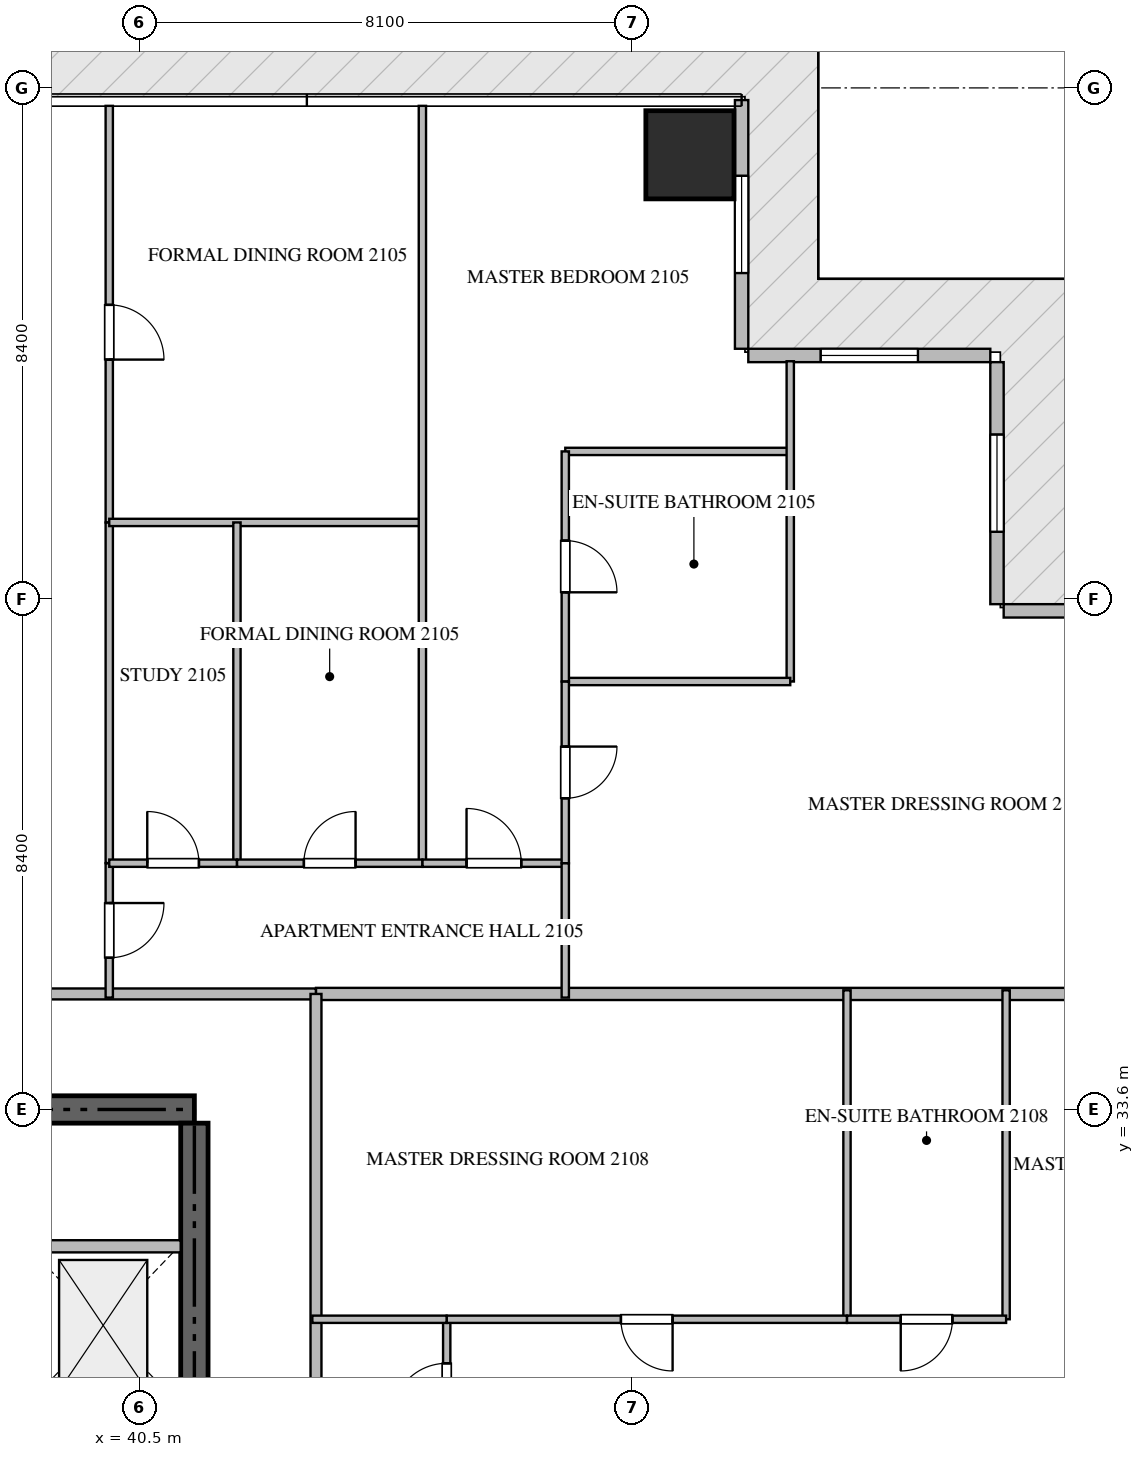
"""IFC4 building model, lengths in metres.
Left out: names, types, materials, properties, quantities, classifications, styles, units other than length and angle.
Written with IfcOpenShell. Run it as: python <this file> out.ifc"""

import sys

from ifc_helpers import new_model, si_unit, direction, frame, frame_2d, origin, origin_2d, place, context, subcontext, project, spatial, rectangle, extrude, source, transform, mapped, element, fill, save


model = new_model("IFC4")
c1 = context("Model", 3, precision=1e-05, world=origin(), true_north=direction((0.0, 1.0)))
c2 = subcontext(c1, "Body", "Model", "MODEL_VIEW")
j1 = project(units=[si_unit("LENGTHUNIT", "METRE"), si_unit("PLANEANGLEUNIT", "RADIAN")], contexts=[c1])
p1 = place(None, origin())
s1 = spatial("IfcSite", under=j1, at=p1, CompositionType="ELEMENT")
p2 = place(p1, origin())
s2 = spatial("IfcBuilding", under=s1, at=p2, CompositionType="ELEMENT")
p3 = place(p2, frame((0.0, 0.0, 86.7)))
s3 = spatial("IfcBuildingStorey", under=s2, at=p3, CompositionType="ELEMENT", Elevation=86.7)
p4 = place(p3, frame((41.4, 33.6, -0.26), z_axis=(0.0, 0.0, 1.0), x_axis=(-1.0, 0.0, 0.0)))
e1 = element("IfcWall", 1, at=p4, inside=s3, PredefinedType="SHEAR", context=c2, shape_type="SweptSolid", body=[
    extrude(rectangle(XDim=18.0, YDim=0.45, at=frame_2d((9.0, 0.0))), origin(), (0.0, 0.0, 1.0), 3.748),
])
p5 = place(p3, frame((41.4, 27.75, -0.26), z_axis=(0.0, 0.0, 1.0), x_axis=(0.0, 1.0, 0.0)))
e2 = element("IfcWall", 2, at=p5, inside=s3, PredefinedType="SHEAR", context=c2, shape_type="SweptSolid", body=[
    extrude(rectangle(XDim=5.625, YDim=0.45, at=frame_2d((2.812, 0.0))), origin(), (0.0, 0.0, 1.0), 3.748),
])
m1 = source(origin(), c2, "Body", "SweptSolid", [
    extrude(rectangle(XDim=1.45, YDim=1.45, at=origin_2d()), origin(), (0.0, 0.0, 1.0), 3.75),
])
p6 = place(p3, frame((49.55, 49.3, -0.26), z_axis=(0.0, 0.0, 1.0), x_axis=(1.0, 0.0, 0.0)))
e3 = element("IfcColumn", 3, at=p6, inside=s3, PredefinedType="COLUMN", context=c2, shape_type="MappedRepresentation", body=[
    mapped(m1, transform((0.0, 0.0, 0.0), scale=1.0)),
])
p7 = place(p3, frame((58.8, 41.8, 0.0), z_axis=(0.0, 0.0, 1.0), x_axis=(-1.0, 0.0, 0.0)))
e4 = element("IfcWall", 4, at=p7, inside=s3, PredefinedType="ELEMENTEDWALL", context=c2, shape_type="SweptSolid", body=[
    extrude(rectangle(XDim=4.09, YDim=0.22, at=frame_2d((2.045, 0.0))), origin(), (0.0, 0.0, 1.0), 3.475),
])
p8 = place(p7, frame((1.245, 0.0, 0.65)))
e5 = element("IfcOpeningElement", 5, at=p8, cuts=e4, PredefinedType="OPENING", context=c2, shape_type="SweptSolid", body=[
    extrude(rectangle(XDim=1.6, YDim=2.1, at=frame_2d((0.8, 1.05))), frame((0.0, 0.12, 0.0), z_axis=(0.0, -1.0, 0.0), x_axis=(1.0, 0.0, 0.0)), (0.0, 0.0, 1.0), 0.24),
])
p9 = place(p3, frame((54.6, 41.91, 0.0), z_axis=(0.0, 0.0, 1.0), x_axis=(0.0, 1.0, 0.0)))
e6 = element("IfcWall", 6, at=p9, inside=s3, PredefinedType="ELEMENTEDWALL", context=c2, shape_type="SweptSolid", body=[
    extrude(rectangle(XDim=3.98, YDim=0.22, at=frame_2d((1.99, 0.0))), origin(), (0.0, 0.0, 1.0), 3.475),
])
p10 = place(p9, frame((1.19, 0.0, 0.65)))
e7 = element("IfcOpeningElement", 7, at=p10, cuts=e6, PredefinedType="OPENING", context=c2, shape_type="SweptSolid", body=[
    extrude(rectangle(XDim=1.6, YDim=2.1, at=frame_2d((0.8, 1.05))), frame((0.0, 0.12, 0.0), z_axis=(0.0, -1.0, 0.0), x_axis=(1.0, 0.0, 0.0)), (0.0, 0.0, 1.0), 0.24),
])
p11 = place(p3, frame((54.49, 46.0, 0.0), z_axis=(0.0, 0.0, 1.0), x_axis=(-1.0, 0.0, 0.0)))
e8 = element("IfcWall", 8, at=p11, inside=s3, PredefinedType="ELEMENTEDWALL", context=c2, shape_type="SweptSolid", body=[
    extrude(rectangle(XDim=3.98, YDim=0.22, at=frame_2d((1.99, 0.0))), origin(), (0.0, 0.0, 1.0), 3.475),
])
p12 = place(p11, frame((1.19, 0.0, 0.65)))
e9 = element("IfcOpeningElement", 9, at=p12, cuts=e8, PredefinedType="OPENING", context=c2, shape_type="SweptSolid", body=[
    extrude(rectangle(XDim=1.6, YDim=2.1, at=frame_2d((0.8, 1.05))), frame((0.0, 0.12, 0.0), z_axis=(0.0, -1.0, 0.0), x_axis=(1.0, 0.0, 0.0)), (0.0, 0.0, 1.0), 0.24),
])
p13 = place(p3, frame((50.4, 46.11, 0.0), z_axis=(0.0, 0.0, 1.0), x_axis=(0.0, 1.0, 0.0)))
e10 = element("IfcWall", 10, at=p13, inside=s3, PredefinedType="ELEMENTEDWALL", context=c2, shape_type="SweptSolid", body=[
    extrude(rectangle(XDim=4.09, YDim=0.22, at=frame_2d((2.045, 0.0))), origin(), (0.0, 0.0, 1.0), 3.475),
])
p14 = place(p13, frame((1.245, 0.0, 0.65)))
e11 = element("IfcOpeningElement", 11, at=p14, cuts=e10, PredefinedType="OPENING", context=c2, shape_type="SweptSolid", body=[
    extrude(rectangle(XDim=1.6, YDim=2.1, at=frame_2d((0.8, 1.05))), frame((0.0, 0.12, 0.0), z_axis=(0.0, -1.0, 0.0), x_axis=(1.0, 0.0, 0.0)), (0.0, 0.0, 1.0), 0.24),
])
p15 = place(p3, frame((38.75, 31.35, 0.0), z_axis=(0.0, 0.0, 1.0), x_axis=(1.0, 0.0, 0.0)))
e12 = element("IfcWall", 12, at=p15, inside=s3, PredefinedType="STANDARD", context=c2, shape_type="SweptSolid", body=[
    extrude(rectangle(XDim=2.425, YDim=0.2, at=frame_2d((1.212, 0.0))), origin(), (0.0, 0.0, 1.0), 3.49),
])
p16 = place(p3, frame((43.4, 35.5, 0.0), z_axis=(0.0, 0.0, 1.0), x_axis=(1.0, 0.0, 0.0)))
e13 = element("IfcWall", 13, at=p16, inside=s3, PredefinedType="PARTITIONING", context=c2, shape_type="SweptSolid", body=[
    extrude(rectangle(XDim=15.318, YDim=0.2, at=frame_2d((7.659, 0.0))), origin(), (0.0, 0.0, 1.0), 3.49),
])
p17 = place(p3, frame((21.402, 35.5, 0.0), z_axis=(0.0, 0.0, 1.0), x_axis=(1.0, 0.0, 0.0)))
e14 = element("IfcWall", 14, at=p17, inside=s3, PredefinedType="PARTITIONING", context=c2, shape_type="SweptSolid", body=[
    extrude(rectangle(XDim=21.996, YDim=0.18, at=frame_2d((10.998, 0.0))), origin(), (0.0, 0.0, 1.0), 3.49),
])
p18 = place(p17, frame((15.222, 0.0, 0.0)))
e15 = element("IfcOpeningElement", 15, at=p18, cuts=e14, PredefinedType="OPENING", context=c2, shape_type="SweptSolid", body=[
    extrude(rectangle(XDim=1.0, YDim=2.15, at=frame_2d((0.5, 1.075))), frame((0.0, 0.1, 0.0), z_axis=(0.0, -1.0, 0.0), x_axis=(1.0, 0.0, 0.0)), (0.0, 0.0, 1.0), 0.2),
])
p19 = place(p3, frame((43.4, 14.9, 0.0), z_axis=(0.0, 0.0, 1.0), x_axis=(0.0, 1.0, 0.0)))
e16 = element("IfcWall", 16, at=p19, inside=s3, PredefinedType="PARTITIONING", context=c2, shape_type="SweptSolid", body=[
    extrude(rectangle(XDim=20.6, YDim=0.18, at=frame_2d((10.3, 0.0))), origin(), (0.0, 0.0, 1.0), 3.49),
])
p20 = place(p19, frame((1.96, 0.0, 0.0)))
e17 = element("IfcOpeningElement", 17, at=p20, cuts=e16, PredefinedType="OPENING", context=c2, shape_type="SweptSolid", body=[
    extrude(rectangle(XDim=1.0, YDim=2.15, at=frame_2d((0.5, 1.075))), frame((0.0, 0.1, 0.0), z_axis=(0.0, -1.0, 0.0), x_axis=(1.0, 0.0, 0.0)), (0.0, 0.0, 1.0), 0.2),
])
p21 = place(p3, frame((40.0, 37.65, 0.0), z_axis=(0.0, 0.0, 1.0), x_axis=(0.0, -1.0, 0.0)))
e18 = element("IfcWall", 18, at=p21, inside=s3, PredefinedType="PARTITIONING", context=c2, shape_type="SweptSolid", body=[
    extrude(rectangle(XDim=2.21, YDim=0.12, at=frame_2d((1.105, 0.0))), origin(), (0.0, 0.0, 1.0), 3.49),
])
p22 = place(p21, frame((0.655, 0.0, 0.0)))
e19 = element("IfcOpeningElement", 19, at=p22, cuts=e18, PredefinedType="OPENING", context=c2, shape_type="SweptSolid", body=[
    extrude(rectangle(XDim=0.9, YDim=2.1, at=frame_2d((0.45, 1.05))), frame((0.0, 0.07, 0.0), z_axis=(0.0, -1.0, 0.0), x_axis=(1.0, 0.0, 0.0)), (0.0, 0.0, 1.0), 0.14),
])
p23 = place(p3, frame((40.0, 50.105, 0.0), z_axis=(0.0, 0.0, 1.0), x_axis=(0.0, -1.0, 0.0)))
e20 = element("IfcWall", 20, at=p23, inside=s3, PredefinedType="PARTITIONING", context=c2, shape_type="SweptSolid", body=[
    extrude(rectangle(XDim=6.851, YDim=0.12, at=frame_2d((3.426, 0.0))), origin(), (0.0, 0.0, 1.0), 3.49),
])
p24 = place(p23, frame((3.273, 0.0, 0.0)))
e21 = element("IfcOpeningElement", 21, at=p24, cuts=e20, PredefinedType="OPENING", context=c2, shape_type="SweptSolid", body=[
    extrude(rectangle(XDim=0.9, YDim=2.1, at=frame_2d((0.45, 1.05))), frame((0.0, 0.07, 0.0), z_axis=(0.0, -1.0, 0.0), x_axis=(1.0, 0.0, 0.0)), (0.0, 0.0, 1.0), 0.14),
])
p25 = place(p3, frame((40.0, 43.252, 0.0), z_axis=(0.0, 0.0, 1.0), x_axis=(0.0, -1.0, 0.0)))
e22 = element("IfcWall", 22, at=p25, inside=s3, PredefinedType="PARTITIONING", context=c2, shape_type="SweptSolid", body=[
    extrude(rectangle(XDim=5.6, YDim=0.12, at=frame_2d((2.8, 0.0))), origin(), (0.0, 0.0, 1.0), 3.49),
])
p26 = place(p3, frame((40.0, 43.254, 0.0), z_axis=(0.0, 0.0, 1.0), x_axis=(1.0, 0.0, 0.0)))
e23 = element("IfcWall", 23, at=p26, inside=s3, PredefinedType="PARTITIONING", context=c2, shape_type="SweptSolid", body=[
    extrude(rectangle(XDim=5.15, YDim=0.12, at=frame_2d((2.575, 0.0))), origin(), (0.0, 0.0, 1.0), 3.49),
])
p27 = place(p3, frame((45.15, 50.105, 0.0), z_axis=(0.0, 0.0, 1.0), x_axis=(0.0, -1.0, 0.0)))
e24 = element("IfcWall", 24, at=p27, inside=s3, PredefinedType="PARTITIONING", context=c2, shape_type="SweptSolid", body=[
    extrude(rectangle(XDim=12.455, YDim=0.12, at=frame_2d((6.228, 0.0))), origin(), (0.0, 0.0, 1.0), 3.49),
])
p28 = place(p3, frame((42.1, 43.254, 0.0), z_axis=(0.0, 0.0, 1.0), x_axis=(0.0, -1.0, 0.0)))
e25 = element("IfcWall", 25, at=p28, inside=s3, PredefinedType="PARTITIONING", context=c2, shape_type="SweptSolid", body=[
    extrude(rectangle(XDim=5.604, YDim=0.12, at=frame_2d((2.802, 0.0))), origin(), (0.0, 0.0, 1.0), 3.49),
])
p29 = place(p3, frame((40.0, 37.65, 0.0), z_axis=(0.0, 0.0, 1.0), x_axis=(1.0, 0.0, 0.0)))
e26 = element("IfcWall", 26, at=p29, inside=s3, PredefinedType="PARTITIONING", context=c2, shape_type="SweptSolid", body=[
    extrude(rectangle(XDim=2.1, YDim=0.12, at=frame_2d((1.05, 0.0))), origin(), (0.0, 0.0, 1.0), 3.49),
])
p30 = place(p29, frame((0.625, 0.0, 0.0)))
e27 = element("IfcOpeningElement", 27, at=p30, cuts=e26, PredefinedType="OPENING", context=c2, shape_type="SweptSolid", body=[
    extrude(rectangle(XDim=0.85, YDim=2.1, at=frame_2d((0.425, 1.05))), frame((0.0, 0.07, 0.0), z_axis=(0.0, -1.0, 0.0), x_axis=(1.0, 0.0, 0.0)), (0.0, 0.0, 1.0), 0.14),
])
p31 = place(p3, frame((42.102, 37.65, 0.0), z_axis=(0.0, 0.0, 1.0), x_axis=(1.0, 0.0, 0.0)))
e28 = element("IfcWall", 28, at=p31, inside=s3, PredefinedType="PARTITIONING", context=c2, shape_type="SweptSolid", body=[
    extrude(rectangle(XDim=3.048, YDim=0.12, at=frame_2d((1.524, 0.0))), origin(), (0.0, 0.0, 1.0), 3.49),
])
p32 = place(p31, frame((1.099, 0.0, 0.0)))
e29 = element("IfcOpeningElement", 29, at=p32, cuts=e28, PredefinedType="OPENING", context=c2, shape_type="SweptSolid", body=[
    extrude(rectangle(XDim=0.85, YDim=2.1, at=frame_2d((0.425, 1.05))), frame((0.0, 0.07, 0.0), z_axis=(0.0, -1.0, 0.0), x_axis=(1.0, 0.0, 0.0)), (0.0, 0.0, 1.0), 0.14),
])
p33 = place(p3, frame((45.152, 37.65, 0.0), z_axis=(0.0, 0.0, 1.0), x_axis=(1.0, 0.0, 0.0)))
e30 = element("IfcWall", 30, at=p33, inside=s3, PredefinedType="PARTITIONING", context=c2, shape_type="SweptSolid", body=[
    extrude(rectangle(XDim=2.348, YDim=0.12, at=frame_2d((1.174, 0.0))), origin(), (0.0, 0.0, 1.0), 3.49),
])
p34 = place(p33, frame((0.724, 0.0, 0.0)))
e31 = element("IfcOpeningElement", 31, at=p34, cuts=e30, PredefinedType="OPENING", context=c2, shape_type="SweptSolid", body=[
    extrude(rectangle(XDim=0.9, YDim=2.1, at=frame_2d((0.45, 1.05))), frame((0.0, 0.07, 0.0), z_axis=(0.0, -1.0, 0.0), x_axis=(1.0, 0.0, 0.0)), (0.0, 0.0, 1.0), 0.14),
])
p35 = place(p3, frame((47.5, 44.422, 0.0), z_axis=(0.0, 0.0, 1.0), x_axis=(1.0, 0.0, 0.0)))
e32 = element("IfcWall", 32, at=p35, inside=s3, PredefinedType="PARTITIONING", context=c2, shape_type="SweptSolid", body=[
    extrude(rectangle(XDim=3.7, YDim=0.12, at=frame_2d((1.85, 0.0))), origin(), (0.0, 0.0, 1.0), 3.49),
])
p36 = place(p3, frame((51.2, 45.905, 0.0), z_axis=(0.0, 0.0, 1.0), x_axis=(0.0, -1.0, 0.0)))
e33 = element("IfcWall", 33, at=p36, inside=s3, PredefinedType="PARTITIONING", context=c2, shape_type="SweptSolid", body=[
    extrude(rectangle(XDim=5.267, YDim=0.12, at=frame_2d((2.634, 0.0))), origin(), (0.0, 0.0, 1.0), 3.49),
])
p37 = place(p3, frame((47.5, 40.638, 0.0), z_axis=(0.0, 0.0, 1.0), x_axis=(1.0, 0.0, 0.0)))
e34 = element("IfcWall", 34, at=p37, inside=s3, PredefinedType="PARTITIONING", context=c2, shape_type="SweptSolid", body=[
    extrude(rectangle(XDim=3.7, YDim=0.12, at=frame_2d((1.85, 0.0))), origin(), (0.0, 0.0, 1.0), 3.49),
])
p38 = place(p3, frame((47.5, 44.422, 0.0), z_axis=(0.0, 0.0, 1.0), x_axis=(0.0, -1.0, 0.0)))
e35 = element("IfcWall", 35, at=p38, inside=s3, PredefinedType="PARTITIONING", context=c2, shape_type="SweptSolid", body=[
    extrude(rectangle(XDim=3.784, YDim=0.12, at=frame_2d((1.892, 0.0))), origin(), (0.0, 0.0, 1.0), 3.49),
])
p39 = place(p38, frame((1.467, 0.0, 0.0)))
e36 = element("IfcOpeningElement", 36, at=p39, cuts=e35, PredefinedType="OPENING", context=c2, shape_type="SweptSolid", body=[
    extrude(rectangle(XDim=0.85, YDim=2.1, at=frame_2d((0.425, 1.05))), frame((0.0, 0.07, 0.0), z_axis=(0.0, -1.0, 0.0), x_axis=(1.0, 0.0, 0.0)), (0.0, 0.0, 1.0), 0.14),
])
p40 = place(p3, frame((47.5, 40.636, 0.0), z_axis=(0.0, 0.0, 1.0), x_axis=(0.0, -1.0, 0.0)))
e37 = element("IfcWall", 37, at=p40, inside=s3, PredefinedType="PARTITIONING", context=c2, shape_type="SweptSolid", body=[
    extrude(rectangle(XDim=2.986, YDim=0.12, at=frame_2d((1.493, 0.0))), origin(), (0.0, 0.0, 1.0), 3.49),
])
p41 = place(p40, frame((1.068, 0.0, 0.0)))
e38 = element("IfcOpeningElement", 38, at=p41, cuts=e37, PredefinedType="OPENING", context=c2, shape_type="SweptSolid", body=[
    extrude(rectangle(XDim=0.85, YDim=2.1, at=frame_2d((0.425, 1.05))), frame((0.0, 0.07, 0.0), z_axis=(0.0, -1.0, 0.0), x_axis=(1.0, 0.0, 0.0)), (0.0, 0.0, 1.0), 0.14),
])
p42 = place(p3, frame((47.5, 37.648, 0.0), z_axis=(0.0, 0.0, 1.0), x_axis=(0.0, -1.0, 0.0)))
e39 = element("IfcWall", 39, at=p42, inside=s3, PredefinedType="PARTITIONING", context=c2, shape_type="SweptSolid", body=[
    extrude(rectangle(XDim=2.208, YDim=0.12, at=frame_2d((1.104, 0.0))), origin(), (0.0, 0.0, 1.0), 3.49),
])
p43 = place(p3, frame((45.55, 27.802, 0.0), z_axis=(0.0, 0.0, 1.0), x_axis=(0.0, 1.0, 0.0)))
e40 = element("IfcWall", 40, at=p43, inside=s3, PredefinedType="PARTITIONING", context=c2, shape_type="SweptSolid", body=[
    extrude(rectangle(XDim=2.348, YDim=0.12, at=frame_2d((1.174, 0.0))), origin(), (0.0, 0.0, 1.0), 3.49),
])
p44 = place(p43, frame((0.724, 0.0, 0.0)))
e41 = element("IfcOpeningElement", 41, at=p44, cuts=e40, PredefinedType="OPENING", context=c2, shape_type="SweptSolid", body=[
    extrude(rectangle(XDim=0.9, YDim=2.1, at=frame_2d((0.45, 1.05))), frame((0.0, 0.07, 0.0), z_axis=(0.0, -1.0, 0.0), x_axis=(1.0, 0.0, 0.0)), (0.0, 0.0, 1.0), 0.14),
])
for number, where, z_axis, x_axis in (
    (42, (54.75, 30.15, 0.0), (0.0, 0.0, 1.0), (0.0, 1.0, 0.0)),
    (43, (52.133, 30.15, 0.0), (0.0, 0.0, 1.0), (0.0, 1.0, 0.0)),
):
    element("IfcWall", number, at=place(p3, frame(where, z_axis=z_axis, x_axis=x_axis)), inside=s3, PredefinedType="PARTITIONING", context=c2, shape_type="SweptSolid", body=[
        extrude(rectangle(XDim=5.41, YDim=0.12, at=frame_2d((2.705, 0.0))), origin(), (0.0, 0.0, 1.0), 3.49),
    ])
p45 = place(p3, frame((54.75, 30.15, 0.0), z_axis=(0.0, 0.0, 1.0), x_axis=(-1.0, 0.0, 0.0)))
e44 = element("IfcWall", 44, at=p45, inside=s3, PredefinedType="PARTITIONING", context=c2, shape_type="SweptSolid", body=[
    extrude(rectangle(XDim=2.617, YDim=0.12, at=frame_2d((1.309, 0.0))), origin(), (0.0, 0.0, 1.0), 3.49),
])
p46 = place(p45, frame((0.883, 0.0, 0.0)))
e45 = element("IfcOpeningElement", 45, at=p46, cuts=e44, PredefinedType="OPENING", context=c2, shape_type="SweptSolid", body=[
    extrude(rectangle(XDim=0.85, YDim=2.1, at=frame_2d((0.425, 1.05))), frame((0.0, 0.07, 0.0), z_axis=(0.0, -1.0, 0.0), x_axis=(1.0, 0.0, 0.0)), (0.0, 0.0, 1.0), 0.14),
])
p47 = place(p3, frame((52.131, 30.15, 0.0), z_axis=(0.0, 0.0, 1.0), x_axis=(-1.0, 0.0, 0.0)))
e46 = element("IfcWall", 46, at=p47, inside=s3, PredefinedType="PARTITIONING", context=c2, shape_type="SweptSolid", body=[
    extrude(rectangle(XDim=6.581, YDim=0.12, at=frame_2d((3.291, 0.0))), origin(), (0.0, 0.0, 1.0), 3.49),
])
p48 = place(p47, frame((2.866, 0.0, 0.0)))
e47 = element("IfcOpeningElement", 47, at=p48, cuts=e46, PredefinedType="OPENING", context=c2, shape_type="SweptSolid", body=[
    extrude(rectangle(XDim=0.85, YDim=2.1, at=frame_2d((0.425, 1.05))), frame((0.0, 0.07, 0.0), z_axis=(0.0, -1.0, 0.0), x_axis=(1.0, 0.0, 0.0)), (0.0, 0.0, 1.0), 0.14),
])
p49 = place(p3, frame((45.548, 30.15, 0.0), z_axis=(0.0, 0.0, 1.0), x_axis=(-1.0, 0.0, 0.0)))
e48 = element("IfcWall", 48, at=p49, inside=s3, PredefinedType="PARTITIONING", context=c2, shape_type="SweptSolid", body=[
    extrude(rectangle(XDim=2.208, YDim=0.12, at=frame_2d((1.104, 0.0))), origin(), (0.0, 0.0, 1.0), 3.49),
])
m2 = source(origin(), c2, "Body", "SweptSolid", [
    extrude(rectangle(XDim=1.6, YDim=2.1, at=frame_2d((0.8, 1.05))), frame((0.0, 0.03, 0.0), z_axis=(0.0, -1.0, 0.0), x_axis=(1.0, 0.0, 0.0)), (0.0, 0.0, 1.0), 0.06),
])
p50 = place(p10, origin())
e49 = element("IfcWindow", 49, at=p50, inside=s3, PartitioningType="SINGLE_PANEL", PredefinedType="WINDOW", context=c2, shape_type="MappedRepresentation", body=[
    mapped(m2, transform((0.0, 0.0, 0.0), scale=1.0)),
])
fill(e7, e49)
p51 = place(p12, origin())
e50 = element("IfcWindow", 50, at=p51, inside=s3, PartitioningType="SINGLE_PANEL", PredefinedType="WINDOW", context=c2, shape_type="MappedRepresentation", body=[
    mapped(m2, transform((0.0, 0.0, 0.0), scale=1.0)),
])
fill(e9, e50)
p52 = place(p14, origin())
e51 = element("IfcWindow", 51, at=p52, inside=s3, PartitioningType="SINGLE_PANEL", PredefinedType="WINDOW", context=c2, shape_type="MappedRepresentation", body=[
    mapped(m2, transform((0.0, 0.0, 0.0), scale=1.0)),
])
fill(e11, e51)
m3 = source(origin(), c2, "Body", "SweptSolid", [
    extrude(rectangle(XDim=0.9, YDim=2.1, at=frame_2d((0.45, 1.05))), frame((0.0, 0.025, 0.0), z_axis=(0.0, -1.0, 0.0), x_axis=(1.0, 0.0, 0.0)), (0.0, 0.0, 1.0), 0.05),
])
p53 = place(p22, origin())
e52 = element("IfcDoor", 52, at=p53, inside=s3, OperationType="SINGLE_SWING_LEFT", PredefinedType="DOOR", context=c2, shape_type="MappedRepresentation", body=[
    mapped(m3, transform((0.0, 0.0, 0.0), scale=1.0)),
])
fill(e19, e52)
p54 = place(p24, origin())
e53 = element("IfcDoor", 53, at=p54, inside=s3, OperationType="SINGLE_SWING_RIGHT", PredefinedType="DOOR", context=c2, shape_type="MappedRepresentation", body=[
    mapped(m3, transform((0.0, 0.0, 0.0), scale=1.0)),
])
fill(e21, e53)
m4 = source(origin(), c2, "Body", "SweptSolid", [
    extrude(rectangle(XDim=0.85, YDim=2.1, at=frame_2d((0.425, 1.05))), frame((0.0, 0.025, 0.0), z_axis=(0.0, -1.0, 0.0), x_axis=(1.0, 0.0, 0.0)), (0.0, 0.0, 1.0), 0.05),
])
p55 = place(p30, origin())
e54 = element("IfcDoor", 54, at=p55, inside=s3, OperationType="SINGLE_SWING_LEFT", PredefinedType="DOOR", context=c2, shape_type="MappedRepresentation", body=[
    mapped(m4, transform((0.0, 0.0, 0.0), scale=1.0)),
])
fill(e27, e54)
p56 = place(p32, origin())
e55 = element("IfcDoor", 55, at=p56, inside=s3, OperationType="SINGLE_SWING_RIGHT", PredefinedType="DOOR", context=c2, shape_type="MappedRepresentation", body=[
    mapped(m4, transform((0.0, 0.0, 0.0), scale=1.0)),
])
fill(e29, e55)
p57 = place(p34, origin())
e56 = element("IfcDoor", 56, at=p57, inside=s3, OperationType="SINGLE_SWING_LEFT", PredefinedType="DOOR", context=c2, shape_type="MappedRepresentation", body=[
    mapped(m3, transform((0.0, 0.0, 0.0), scale=1.0)),
])
fill(e31, e56)
p58 = place(p39, origin())
e57 = element("IfcDoor", 57, at=p58, inside=s3, OperationType="SINGLE_SWING_RIGHT", PredefinedType="DOOR", context=c2, shape_type="MappedRepresentation", body=[
    mapped(m4, transform((0.0, 0.0, 0.0), scale=1.0)),
])
fill(e36, e57)
p59 = place(p41, origin())
e58 = element("IfcDoor", 58, at=p59, inside=s3, OperationType="SINGLE_SWING_LEFT", PredefinedType="DOOR", context=c2, shape_type="MappedRepresentation", body=[
    mapped(m4, transform((0.0, 0.0, 0.0), scale=1.0)),
])
fill(e38, e58)
p60 = place(p44, origin())
e59 = element("IfcDoor", 59, at=p60, inside=s3, OperationType="SINGLE_SWING_LEFT", PredefinedType="DOOR", context=c2, shape_type="MappedRepresentation", body=[
    mapped(m3, transform((0.0, 0.0, 0.0), scale=1.0)),
])
fill(e41, e59)
p61 = place(p46, origin())
e60 = element("IfcDoor", 60, at=p61, inside=s3, OperationType="SINGLE_SWING_RIGHT", PredefinedType="DOOR", context=c2, shape_type="MappedRepresentation", body=[
    mapped(m4, transform((0.0, 0.0, 0.0), scale=1.0)),
])
fill(e45, e60)
p62 = place(p48, origin())
e61 = element("IfcDoor", 61, at=p62, inside=s3, OperationType="SINGLE_SWING_LEFT", PredefinedType="DOOR", context=c2, shape_type="MappedRepresentation", body=[
    mapped(m4, transform((0.0, 0.0, 0.0), scale=1.0)),
])
fill(e47, e61)
save(model, sys.argv[1])
